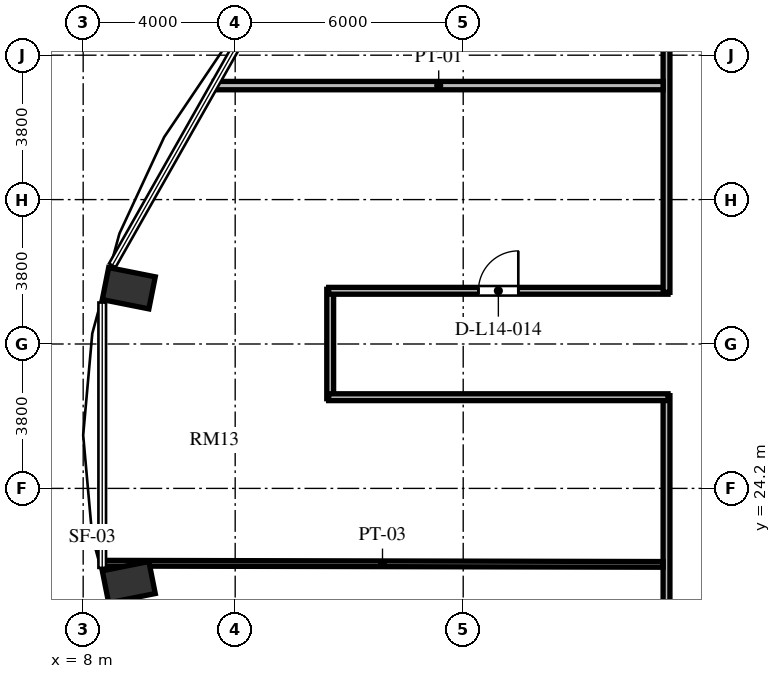
"""IFC4 building model, lengths in metres.
Left out: names, types, materials, properties, quantities, classifications, styles, units other than length and angle.
Written with IfcOpenShell. Run it as: python <this file> out.ifc"""

import sys

from ifc_helpers import new_model, si_unit, direction, frame, frame_2d, origin, origin_2d, place, context, subcontext, project, spatial, rectangle, extrude, element, fill, save


model = new_model("IFC4")
c1 = context("Model", 3, precision=1e-05, world=origin(), true_north=direction((0.0, 1.0)))
c2 = subcontext(c1, "Body", "Model", "MODEL_VIEW")
j1 = project(units=[si_unit("LENGTHUNIT", "METRE"), si_unit("PLANEANGLEUNIT", "RADIAN")], contexts=[c1])
p1 = place(None, origin())
s1 = spatial("IfcSite", under=j1, at=p1, CompositionType="ELEMENT")
p2 = place(p1, origin())
s2 = spatial("IfcBuilding", under=s1, at=p2, CompositionType="ELEMENT")
p3 = place(p2, frame((0.0, 0.0, 58.032)))
s3 = spatial("IfcBuildingStorey", under=s2, at=p3, CompositionType="ELEMENT", Elevation=58.032)
for number, where, z_axis, x_axis in (
    (1, (9.2, 29.468, 0.0), (0.0, 0.0, 1.0), (-0.981, 0.195, 0.0)),
    (2, (9.2, 21.732, 0.0), (0.0, 0.0, 1.0), (-0.981, -0.195, 0.0)),
):
    element("IfcColumn", number, at=place(p3, frame(where, z_axis=z_axis, x_axis=x_axis)), inside=s3, PredefinedType="COLUMN", context=c2, shape_type="SweptSolid", body=[
        extrude(rectangle(XDim=1.25, YDim=0.86, at=origin_2d()), origin(), (0.0, 0.0, 1.0), 3.648),
    ])
p4 = place(p3, frame((14.5, 26.56, 0.0), z_axis=(0.0, 0.0, 1.0), x_axis=(0.0, 1.0, 0.0)))
e3 = element("IfcWall", 3, at=p4, inside=s3, PredefinedType="PARTITIONING", context=c2, shape_type="SweptSolid", body=[
    extrude(rectangle(XDim=2.88, YDim=0.18, at=frame_2d((1.44, 0.0))), origin(), (0.0, 0.0, 1.0), 3.428),
])
p5 = place(p3, frame((14.46, 29.4, 0.0), z_axis=(0.0, 0.0, 1.0), x_axis=(1.0, 0.0, 0.0)))
e4 = element("IfcWall", 4, at=p5, inside=s3, PredefinedType="PARTITIONING", context=c2, shape_type="SweptSolid", body=[
    extrude(rectangle(XDim=8.93, YDim=0.18, at=frame_2d((4.465, 0.0))), origin(), (0.0, 0.0, 1.0), 3.428),
])
p6 = place(p5, frame((3.94, 0.0, 0.0)))
e5 = element("IfcOpeningElement", 5, at=p6, cuts=e4, PredefinedType="OPENING", context=c2, shape_type="SweptSolid", body=[
    extrude(rectangle(XDim=1.05, YDim=2.15, at=frame_2d((0.525, 1.075))), frame((0.0, 0.1, 0.0), z_axis=(0.0, -1.0, 0.0), x_axis=(1.0, 0.0, 0.0)), (0.0, 0.0, 1.0), 0.2),
])
p7 = place(p3, frame((23.35, 29.36, 0.0), z_axis=(0.0, 0.0, 1.0), x_axis=(0.0, 1.0, 0.0)))
e6 = element("IfcWall", 6, at=p7, inside=s3, PredefinedType="PARTITIONING", context=c2, shape_type="SweptSolid", body=[
    extrude(rectangle(XDim=9.43, YDim=0.18, at=frame_2d((4.715, 0.0))), origin(), (0.0, 0.0, 1.0), 3.428),
])
p8 = place(p3, frame((23.35, 17.36, 0.0), z_axis=(0.0, 0.0, 1.0), x_axis=(0.0, 1.0, 0.0)))
e7 = element("IfcWall", 7, at=p8, inside=s3, PredefinedType="PARTITIONING", context=c2, shape_type="SweptSolid", body=[
    extrude(rectangle(XDim=9.28, YDim=0.18, at=frame_2d((4.64, 0.0))), origin(), (0.0, 0.0, 1.0), 3.428),
])
p9 = place(p3, frame((23.39, 26.6, 0.0), z_axis=(0.0, 0.0, 1.0), x_axis=(-1.0, 0.0, 0.0)))
e8 = element("IfcWall", 8, at=p9, inside=s3, PredefinedType="PARTITIONING", context=c2, shape_type="SweptSolid", body=[
    extrude(rectangle(XDim=8.93, YDim=0.18, at=frame_2d((4.465, 0.0))), origin(), (0.0, 0.0, 1.0), 3.428),
])
p10 = place(p3, frame((8.493, 22.231, 0.0), z_axis=(0.0, 0.0, 1.0), x_axis=(0.999997760873, -0.002116187438, 0.0)))
e9 = element("IfcWall", 9, at=p10, inside=s3, PredefinedType="PARTITIONING", context=c2, shape_type="SweptSolid", body=[
    extrude(rectangle(XDim=14.767, YDim=0.15, at=frame_2d((7.384, 0.0))), origin(), (0.0, 0.0, 1.0), 3.428),
])
p11 = place(p3, frame((11.451, 34.8, 0.0), z_axis=(0.0, 0.0, 1.0), x_axis=(1.0, 0.0, 0.0)))
e10 = element("IfcWall", 10, at=p11, inside=s3, PredefinedType="PARTITIONING", context=c2, shape_type="SweptSolid", body=[
    extrude(rectangle(XDim=11.809, YDim=0.22, at=frame_2d((5.905, 0.0))), origin(), (0.0, 0.0, 1.0), 3.428),
])
p12 = place(p6, origin())
e11 = element("IfcDoor", 11, at=p12, inside=s3, OperationType="SINGLE_SWING_RIGHT", PredefinedType="DOOR", context=c2, shape_type="SweptSolid", body=[
    extrude(rectangle(XDim=1.05, YDim=2.15, at=frame_2d((0.525, 1.075))), frame((0.0, 0.025, 0.0), z_axis=(0.0, -1.0, 0.0), x_axis=(1.0, 0.0, 0.0)), (0.0, 0.0, 1.0), 0.05),
])
fill(e5, e11)
save(model, sys.argv[1])
